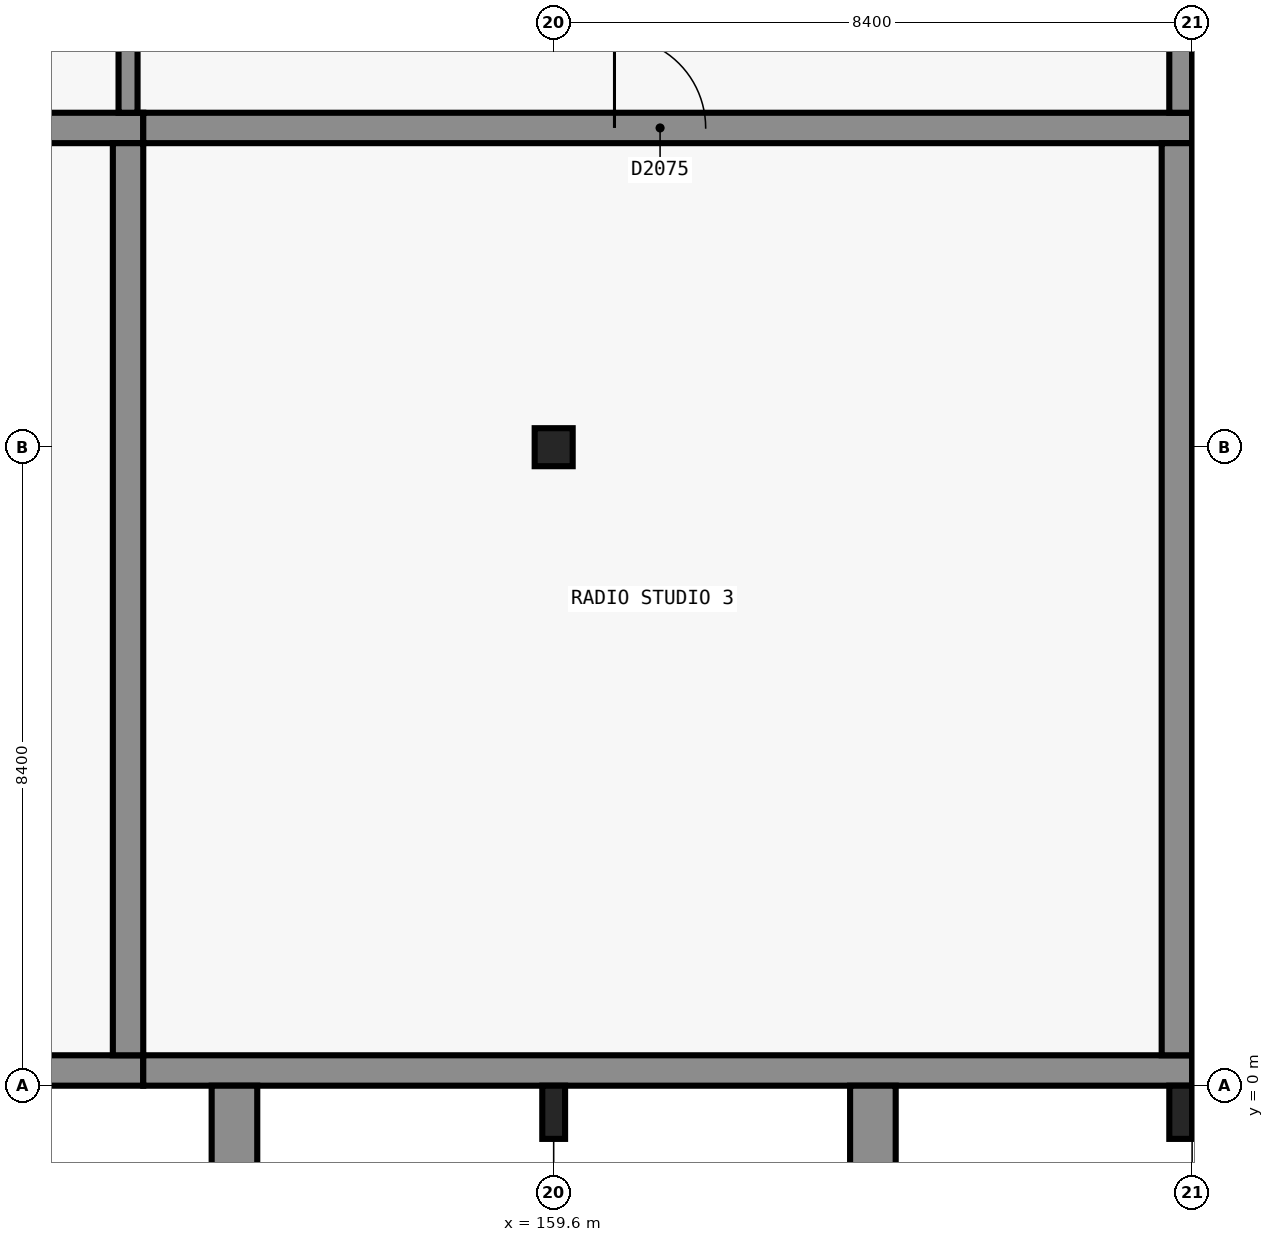
"""IFC4 building model, lengths in metres.
Left out: names, types, materials, properties, quantities, classifications, styles, units other than length and angle.
Written with IfcOpenShell. Run it as: python <this file> out.ifc"""

import sys

from ifc_helpers import new_model, si_unit, direction, frame, frame_2d, origin, origin_2d, place, context, subcontext, project, spatial, rectangle, extrude, element, fill, save


model = new_model("IFC4")
c1 = context("Model", 3, precision=1e-05, world=origin(), true_north=direction((0.0, 1.0)))
c2 = subcontext(c1, "Body", "Model", "MODEL_VIEW")
j1 = project(units=[si_unit("LENGTHUNIT", "METRE"), si_unit("PLANEANGLEUNIT", "RADIAN")], contexts=[c1])
p1 = place(None, origin())
s1 = spatial("IfcSite", under=j1, at=p1, CompositionType="ELEMENT")
p2 = place(p1, origin())
s2 = spatial("IfcBuilding", under=s1, at=p2, CompositionType="ELEMENT")
p3 = place(p2, frame((0.0, 0.0, 10.2)))
s3 = spatial("IfcBuildingStorey", under=s2, at=p3, CompositionType="ELEMENT", Elevation=10.2)
p4 = place(p3, frame((154.2, 0.2, 0.0), z_axis=(0.0, 0.0, 1.0), x_axis=(-1.0, 0.0, 0.0)))
e1 = element("IfcWall", 1, at=p4, inside=s3, PredefinedType="SHEAR", context=c2, shape_type="SweptSolid", body=[
    extrude(rectangle(XDim=14.0, YDim=0.4, at=frame_2d((7.0, 0.0))), origin(), (0.0, 0.0, 1.0), 4.8),
])
p5 = place(p3, frame((140.2, 12.6, 0.0), z_axis=(0.0, 0.0, 1.0), x_axis=(1.0, 0.0, 0.0)))
e2 = element("IfcWall", 2, at=p5, inside=s3, PredefinedType="SHEAR", context=c2, shape_type="SweptSolid", body=[
    extrude(rectangle(XDim=14.0, YDim=0.4, at=frame_2d((7.0, 0.0))), origin(), (0.0, 0.0, 1.0), 4.8),
])
p6 = place(p5, frame((6.2, 0.0, 0.0)))
e3 = element("IfcOpeningElement", 3, at=p6, cuts=e2, PredefinedType="OPENING", context=c2, shape_type="SweptSolid", body=[
    extrude(rectangle(XDim=1.2, YDim=2.1, at=frame_2d((0.6, 1.05))), frame((0.0, 0.21, 0.0), z_axis=(0.0, -1.0, 0.0), x_axis=(1.0, 0.0, 0.0)), (0.0, 0.0, 1.0), 0.42),
])
p7 = place(p3, frame((154.0, 12.4, 0.0), z_axis=(0.0, 0.0, 1.0), x_axis=(0.0, -1.0, 0.0)))
e4 = element("IfcWall", 4, at=p7, inside=s3, PredefinedType="SHEAR", context=c2, shape_type="SweptSolid", body=[
    extrude(rectangle(XDim=12.0, YDim=0.4, at=frame_2d((6.0, 0.0))), origin(), (0.0, 0.0, 1.0), 4.8),
])
p8 = place(p3, frame((168.0, 0.2, 0.0), z_axis=(0.0, 0.0, 1.0), x_axis=(-1.0, 0.0, 0.0)))
e5 = element("IfcWall", 5, at=p8, inside=s3, PredefinedType="SHEAR", context=c2, shape_type="SweptSolid", body=[
    extrude(rectangle(XDim=13.8, YDim=0.4, at=frame_2d((6.9, 0.0))), origin(), (0.0, 0.0, 1.0), 4.8),
])
p9 = place(p3, frame((154.2, 12.6, 0.0), z_axis=(0.0, 0.0, 1.0), x_axis=(1.0, 0.0, 0.0)))
e6 = element("IfcWall", 6, at=p9, inside=s3, PredefinedType="SHEAR", context=c2, shape_type="SweptSolid", body=[
    extrude(rectangle(XDim=13.8, YDim=0.4, at=frame_2d((6.9, 0.0))), origin(), (0.0, 0.0, 1.0), 4.8),
])
p10 = place(p9, frame((6.2, 0.0, 0.0)))
e7 = element("IfcOpeningElement", 7, at=p10, cuts=e6, PredefinedType="OPENING", context=c2, shape_type="SweptSolid", body=[
    extrude(rectangle(XDim=1.2, YDim=2.1, at=frame_2d((0.6, 1.05))), frame((0.0, 0.21, 0.0), z_axis=(0.0, -1.0, 0.0), x_axis=(1.0, 0.0, 0.0)), (0.0, 0.0, 1.0), 0.42),
])
p11 = place(p3, frame((167.8, 12.4, 0.0), z_axis=(0.0, 0.0, 1.0), x_axis=(0.0, -1.0, 0.0)))
e8 = element("IfcWall", 8, at=p11, inside=s3, PredefinedType="SHEAR", context=c2, shape_type="SweptSolid", body=[
    extrude(rectangle(XDim=12.0, YDim=0.4, at=frame_2d((6.0, 0.0))), origin(), (0.0, 0.0, 1.0), 4.8),
])
p12 = place(p3, frame((167.85, 16.6, 0.0), z_axis=(0.0, 0.0, 1.0), x_axis=(0.0, -1.0, 0.0)))
e9 = element("IfcWall", 9, at=p12, inside=s3, PredefinedType="SOLIDWALL", context=c2, shape_type="SweptSolid", body=[
    extrude(rectangle(XDim=3.8, YDim=0.3, at=frame_2d((1.9, 0.0))), origin(), (0.0, 0.0, 1.0), 4.8),
])
p13 = place(p3, frame((159.6, 8.4, 0.0), z_axis=(0.0, 0.0, 1.0), x_axis=(1.0, 0.0, 0.0)))
e10 = element("IfcColumn", 10, at=p13, inside=s3, PredefinedType="COLUMN", context=c2, shape_type="SweptSolid", body=[
    extrude(rectangle(XDim=0.5, YDim=0.5, at=origin_2d()), origin(), (0.0, 0.0, 1.0), 4.8),
])
for number, where, z_axis, x_axis in (
    (11, (159.6, -0.35, 0.0), (0.0, 0.0, 1.0), (1.0, 0.0, 0.0)),
    (12, (167.85, -0.35, 0.0), (0.0, 0.0, 1.0), (1.0, 0.0, 0.0)),
):
    element("IfcColumn", number, at=place(p3, frame(where, z_axis=z_axis, x_axis=x_axis)), inside=s3, PredefinedType="PILASTER", context=c2, shape_type="SweptSolid", body=[
        extrude(rectangle(XDim=0.3, YDim=0.7, at=origin_2d()), origin(), (0.0, 0.0, 1.0), 4.8),
    ])
for number, where, z_axis, x_axis in (
    (13, (155.4, 0.0, 0.0), (0.0, 0.0, 1.0), (0.0, -1.0, 0.0)),
    (14, (163.8, 0.0, 0.0), (0.0, 0.0, 1.0), (0.0, -1.0, 0.0)),
):
    element("IfcWall", number, at=place(p3, frame(where, z_axis=z_axis, x_axis=x_axis)), inside=s3, PredefinedType="SOLIDWALL", context=c2, shape_type="SweptSolid", body=[
        extrude(rectangle(XDim=1.5, YDim=0.6, at=frame_2d((0.75, 0.0))), origin(), (0.0, 0.0, 1.0), 4.8),
    ])
p14 = place(p3, frame((154.0, 12.8, 0.0), z_axis=(0.0, 0.0, 1.0), x_axis=(0.0, 1.0, 0.0)))
e15 = element("IfcWall", 15, at=p14, inside=s3, PredefinedType="PARTITIONING", context=c2, shape_type="SweptSolid", body=[
    extrude(rectangle(XDim=3.875, YDim=0.25, at=frame_2d((1.938, 0.0))), origin(), (0.0, 0.0, 1.0), 3.8),
])
p15 = place(p10, origin())
e16 = element("IfcDoor", 16, at=p15, inside=s3, OperationType="SINGLE_SWING_RIGHT", PredefinedType="DOOR", context=c2, shape_type="SweptSolid", body=[
    extrude(rectangle(XDim=1.2, YDim=2.1, at=frame_2d((0.6, 1.05))), frame((0.0, 0.025, 0.0), z_axis=(0.0, -1.0, 0.0), x_axis=(1.0, 0.0, 0.0)), (0.0, 0.0, 1.0), 0.05),
])
fill(e7, e16)
save(model, sys.argv[1])
